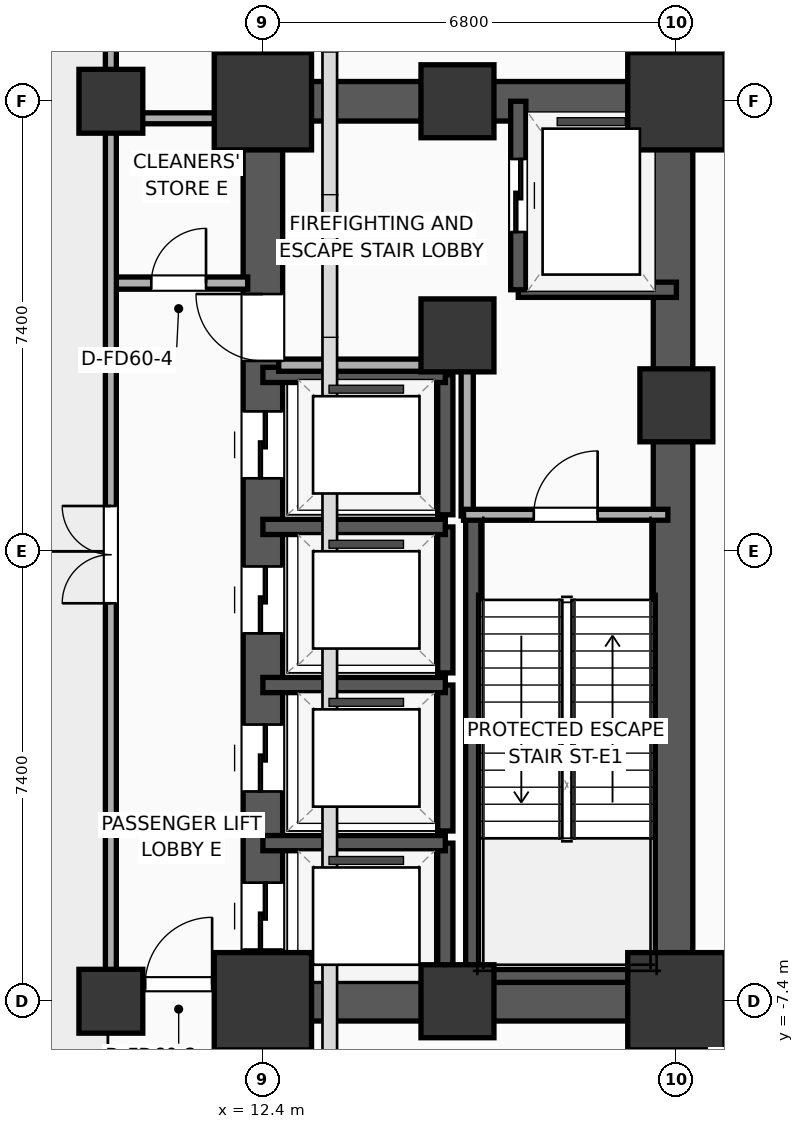
"""IFC4 building model, lengths in metres.
Left out: names, types, materials, properties, quantities, classifications, styles, units other than length and angle.
Written with IfcOpenShell. Run it as: python <this file> out.ifc"""

import sys

from ifc_helpers import new_model, si_unit, direction, frame, frame_2d, origin, origin_2d, place, context, subcontext, project, spatial, rectangle, extrude, element, fill, save


model = new_model("IFC4")
c1 = context("Model", 3, precision=1e-05, world=origin(), true_north=direction((0.0, 1.0)))
c2 = subcontext(c1, "Body", "Model", "MODEL_VIEW")
j1 = project(units=[si_unit("LENGTHUNIT", "METRE"), si_unit("PLANEANGLEUNIT", "RADIAN")], contexts=[c1])
p1 = place(None, origin())
s1 = spatial("IfcSite", under=j1, at=p1, CompositionType="ELEMENT")
p2 = place(p1, origin())
s2 = spatial("IfcBuilding", under=s1, at=p2, CompositionType="ELEMENT")
p3 = place(p2, origin())
s3 = spatial("IfcBuildingStorey", under=s2, at=p3, CompositionType="ELEMENT", Elevation=0.0)
p4 = place(p3, frame((12.4, -7.4, 0.0), z_axis=(0.0, 0.0, 1.0), x_axis=(1.0, 0.0, 0.0)))
e1 = element("IfcColumn", 1, at=p4, inside=s3, PredefinedType="COLUMN", context=c2, shape_type="SweptSolid", body=[
    extrude(rectangle(XDim=1.6, YDim=1.6, at=origin_2d()), origin(), (0.0, 0.0, 1.0), 5.2),
])
p5 = place(p3, frame((15.6, 3.55, 0.0), z_axis=(0.0, 0.0, 1.0), x_axis=(1.0, 0.0, 0.0)))
e2 = element("IfcColumn", 2, at=p5, inside=s3, PredefinedType="COLUMN", context=c2, shape_type="SweptSolid", body=[
    extrude(rectangle(XDim=1.2, YDim=1.2, at=origin_2d()), origin(), (0.0, 0.0, 1.0), 5.2),
])
p6 = place(p3, frame((12.4, 7.4, 0.0), z_axis=(0.0, 0.0, 1.0), x_axis=(1.0, 0.0, 0.0)))
e3 = element("IfcColumn", 3, at=p6, inside=s3, PredefinedType="COLUMN", context=c2, shape_type="SweptSolid", body=[
    extrude(rectangle(XDim=1.6, YDim=1.6, at=origin_2d()), origin(), (0.0, 0.0, 1.0), 5.2),
])
for number, where, z_axis, x_axis in (
    (4, (15.6, -7.4, 0.0), (0.0, 0.0, 1.0), (1.0, 0.0, 0.0)),
    (5, (15.6, 7.4, 0.0), (0.0, 0.0, 1.0), (1.0, 0.0, 0.0)),
):
    element("IfcColumn", number, at=place(p3, frame(where, z_axis=z_axis, x_axis=x_axis)), inside=s3, PredefinedType="COLUMN", context=c2, shape_type="SweptSolid", body=[
        extrude(rectangle(XDim=1.2, YDim=1.2, at=origin_2d()), origin(), (0.0, 0.0, 1.0), 5.2),
    ])
p7 = place(p3, frame((19.2, -7.4, 0.0), z_axis=(0.0, 0.0, 1.0), x_axis=(1.0, 0.0, 0.0)))
e6 = element("IfcColumn", 6, at=p7, inside=s3, PredefinedType="COLUMN", context=c2, shape_type="SweptSolid", body=[
    extrude(rectangle(XDim=1.6, YDim=1.6, at=origin_2d()), origin(), (0.0, 0.0, 1.0), 5.2),
])
p8 = place(p3, frame((19.2, 2.4, 0.0), z_axis=(0.0, 0.0, 1.0), x_axis=(1.0, 0.0, 0.0)))
e7 = element("IfcColumn", 7, at=p8, inside=s3, PredefinedType="COLUMN", context=c2, shape_type="SweptSolid", body=[
    extrude(rectangle(XDim=1.2, YDim=1.2, at=origin_2d()), origin(), (0.0, 0.0, 1.0), 5.2),
])
p9 = place(p3, frame((19.2, 7.4, 0.0), z_axis=(0.0, 0.0, 1.0), x_axis=(1.0, 0.0, 0.0)))
e8 = element("IfcColumn", 8, at=p9, inside=s3, PredefinedType="COLUMN", context=c2, shape_type="SweptSolid", body=[
    extrude(rectangle(XDim=1.6, YDim=1.6, at=origin_2d()), origin(), (0.0, 0.0, 1.0), 5.2),
])
for number, where, z_axis, x_axis in (
    (9, (12.075, -7.4, 0.0), (0.0, 0.0, 1.0), (1.0, 0.0, 0.0)),
    (10, (12.075, 7.4, 0.0), (0.0, 0.0, 1.0), (1.0, 0.0, 0.0)),
):
    element("IfcWall", number, at=place(p3, frame(where, z_axis=z_axis, x_axis=x_axis)), inside=s3, PredefinedType="SHEAR", context=c2, shape_type="SweptSolid", body=[
        extrude(rectangle(XDim=7.45, YDim=0.65, at=frame_2d((3.725, 0.0))), origin(), (0.0, 0.0, 1.0), 4.92),
    ])
p10 = place(p3, frame((12.4, -7.4, 0.0), z_axis=(0.0, 0.0, 1.0), x_axis=(0.0, 1.0, 0.0)))
e11 = element("IfcWall", 11, at=p10, inside=s3, PredefinedType="SHEAR", context=c2, shape_type="SweptSolid", body=[
    extrude(rectangle(XDim=14.8, YDim=0.65, at=frame_2d((7.4, 0.0))), origin(), (0.0, 0.0, 1.0), 4.92),
])
p11 = place(p10, frame((0.85, 0.0, 0.0)))
e12 = element("IfcOpeningElement", 12, at=p11, cuts=e11, PredefinedType="OPENING", context=c2, shape_type="SweptSolid", body=[
    extrude(rectangle(XDim=1.1, YDim=2.05, at=frame_2d((0.55, 1.025))), frame((0.0, 0.335, 0.0), z_axis=(0.0, -1.0, 0.0), x_axis=(1.0, 0.0, 0.0)), (0.0, 0.0, 1.0), 0.67),
])
p12 = place(p10, frame((3.45, 0.0, 0.0)))
e13 = element("IfcOpeningElement", 13, at=p12, cuts=e11, PredefinedType="OPENING", context=c2, shape_type="SweptSolid", body=[
    extrude(rectangle(XDim=1.1, YDim=2.05, at=frame_2d((0.55, 1.025))), frame((0.0, 0.335, 0.0), z_axis=(0.0, -1.0, 0.0), x_axis=(1.0, 0.0, 0.0)), (0.0, 0.0, 1.0), 0.67),
])
p13 = place(p10, frame((6.05, 0.0, 0.0)))
e14 = element("IfcOpeningElement", 14, at=p13, cuts=e11, PredefinedType="OPENING", context=c2, shape_type="SweptSolid", body=[
    extrude(rectangle(XDim=1.1, YDim=2.05, at=frame_2d((0.55, 1.025))), frame((0.0, 0.335, 0.0), z_axis=(0.0, -1.0, 0.0), x_axis=(1.0, 0.0, 0.0)), (0.0, 0.0, 1.0), 0.67),
])
p14 = place(p10, frame((8.6, 0.0, 0.0)))
e15 = element("IfcOpeningElement", 15, at=p14, cuts=e11, PredefinedType="OPENING", context=c2, shape_type="SweptSolid", body=[
    extrude(rectangle(XDim=1.1, YDim=2.05, at=frame_2d((0.55, 1.025))), frame((0.0, 0.335, 0.0), z_axis=(0.0, -1.0, 0.0), x_axis=(1.0, 0.0, 0.0)), (0.0, 0.0, 1.0), 0.67),
])
p15 = place(p10, frame((10.53, 0.0, 0.0)))
e16 = element("IfcOpeningElement", 16, at=p15, cuts=e11, PredefinedType="OPENING", context=c2, shape_type="SweptSolid", body=[
    extrude(rectangle(XDim=1.1, YDim=2.05, at=frame_2d((0.55, 1.025))), frame((0.0, 0.335, 0.0), z_axis=(0.0, -1.0, 0.0), x_axis=(1.0, 0.0, 0.0)), (0.0, 0.0, 1.0), 0.67),
])
p16 = place(p3, frame((19.145, -7.4, 0.0), z_axis=(0.0, 0.0, 1.0), x_axis=(0.0, 1.0, 0.0)))
e17 = element("IfcWall", 17, at=p16, inside=s3, PredefinedType="SHEAR", context=c2, shape_type="SweptSolid", body=[
    extrude(rectangle(XDim=14.8, YDim=0.65, at=frame_2d((7.4, 0.0))), origin(), (0.0, 0.0, 1.0), 4.92),
])
p17 = place(p3, frame((15.86, -7.085, 0.0), z_axis=(0.0, 0.0, 1.0), x_axis=(0.0, 1.0, 0.0)))
e18 = element("IfcWall", 18, at=p17, inside=s3, PredefinedType="SOLIDWALL", context=c2, shape_type="SweptSolid", body=[
    extrude(rectangle(XDim=7.685, YDim=0.25, at=frame_2d((3.843, 0.0))), origin(), (0.0, 0.0, 1.0), 4.92),
])
p18 = place(p3, frame((15.74, -6.965, 0.0), z_axis=(0.0, 0.0, 1.0), x_axis=(1.0, 0.0, 0.0)))
e19 = element("IfcWall", 19, at=p18, inside=s3, PredefinedType="SOLIDWALL", context=c2, shape_type="SweptSolid", body=[
    extrude(rectangle(XDim=3.46, YDim=0.25, at=frame_2d((1.73, 0.0))), origin(), (0.0, 0.0, 1.0), 4.92),
])
for number, where, z_axis, x_axis in (
    (20, (9.9, -7.4, 0.0), (0.0, 0.0, 1.0), (1.0, 0.0, 0.0)),
    (21, (9.9, 7.4, 0.0), (0.0, 0.0, 1.0), (1.0, 0.0, 0.0)),
):
    element("IfcColumn", number, at=place(p3, frame(where, z_axis=z_axis, x_axis=x_axis)), inside=s3, PredefinedType="COLUMN", context=c2, shape_type="SweptSolid", body=[
        extrude(rectangle(XDim=1.05, YDim=1.05, at=origin_2d()), origin(), (0.0, 0.0, 1.0), 5.2),
    ])
p19 = place(p3, frame((16.6, 4.3, 0.0), z_axis=(0.0, 0.0, 1.0), x_axis=(1.0, 0.0, 0.0)))
e22 = element("IfcWall", 22, at=p19, inside=s3, PredefinedType="SOLIDWALL", context=c2, shape_type="SweptSolid", body=[
    extrude(rectangle(XDim=2.6, YDim=0.25, at=frame_2d((1.3, 0.0))), origin(), (0.0, 0.0, 1.0), 4.92),
])
p20 = place(p3, frame((16.6, 7.4, 0.0), z_axis=(0.0, 0.0, 1.0), x_axis=(0.0, -1.0, 0.0)))
e23 = element("IfcWall", 23, at=p20, inside=s3, PredefinedType="SOLIDWALL", context=c2, shape_type="SweptSolid", body=[
    extrude(rectangle(XDim=3.1, YDim=0.25, at=frame_2d((1.55, 0.0))), origin(), (0.0, 0.0, 1.0), 4.92),
])
p21 = place(p20, frame((0.95, 0.0, 0.0)))
e24 = element("IfcOpeningElement", 24, at=p21, cuts=e23, PredefinedType="OPENING", context=c2, shape_type="SweptSolid", body=[
    extrude(rectangle(XDim=1.2, YDim=2.05, at=frame_2d((0.6, 1.025))), frame((0.0, 0.135, 0.0), z_axis=(0.0, -1.0, 0.0), x_axis=(1.0, 0.0, 0.0)), (0.0, 0.0, 1.0), 0.27),
])
p22 = place(p3, frame((15.4, -7.4, 0.0), z_axis=(0.0, 0.0, 1.0), x_axis=(0.0, 1.0, 0.0)))
e25 = element("IfcWall", 25, at=p22, inside=s3, PredefinedType="SOLIDWALL", context=c2, shape_type="SweptSolid", body=[
    extrude(rectangle(XDim=2.6, YDim=0.25, at=frame_2d((1.3, 0.0))), origin(), (0.0, 0.0, 1.0), 4.92),
])
p23 = place(p3, frame((15.4, -4.8, 0.0), z_axis=(0.0, 0.0, 1.0), x_axis=(-1.0, 0.0, 0.0)))
e26 = element("IfcWall", 26, at=p23, inside=s3, PredefinedType="SOLIDWALL", context=c2, shape_type="SweptSolid", body=[
    extrude(rectangle(XDim=3.0, YDim=0.25, at=frame_2d((1.5, 0.0))), origin(), (0.0, 0.0, 1.0), 4.92),
])
p24 = place(p3, frame((15.4, -4.6, 0.0), z_axis=(0.0, 0.0, 1.0), x_axis=(0.0, 1.0, 0.0)))
e27 = element("IfcWall", 27, at=p24, inside=s3, PredefinedType="SOLIDWALL", context=c2, shape_type="SweptSolid", body=[
    extrude(rectangle(XDim=2.4, YDim=0.25, at=frame_2d((1.2, 0.0))), origin(), (0.0, 0.0, 1.0), 4.92),
])
p25 = place(p3, frame((15.4, -2.2, 0.0), z_axis=(0.0, 0.0, 1.0), x_axis=(-1.0, 0.0, 0.0)))
e28 = element("IfcWall", 28, at=p25, inside=s3, PredefinedType="SOLIDWALL", context=c2, shape_type="SweptSolid", body=[
    extrude(rectangle(XDim=3.0, YDim=0.25, at=frame_2d((1.5, 0.0))), origin(), (0.0, 0.0, 1.0), 4.92),
])
p26 = place(p3, frame((15.4, -2.0, 0.0), z_axis=(0.0, 0.0, 1.0), x_axis=(0.0, 1.0, 0.0)))
e29 = element("IfcWall", 29, at=p26, inside=s3, PredefinedType="SOLIDWALL", context=c2, shape_type="SweptSolid", body=[
    extrude(rectangle(XDim=2.4, YDim=0.25, at=frame_2d((1.2, 0.0))), origin(), (0.0, 0.0, 1.0), 4.92),
])
p27 = place(p3, frame((15.4, 0.4, 0.0), z_axis=(0.0, 0.0, 1.0), x_axis=(-1.0, 0.0, 0.0)))
e30 = element("IfcWall", 30, at=p27, inside=s3, PredefinedType="SOLIDWALL", context=c2, shape_type="SweptSolid", body=[
    extrude(rectangle(XDim=3.0, YDim=0.25, at=frame_2d((1.5, 0.0))), origin(), (0.0, 0.0, 1.0), 4.92),
])
p28 = place(p3, frame((15.4, 0.6, 0.0), z_axis=(0.0, 0.0, 1.0), x_axis=(0.0, 1.0, 0.0)))
e31 = element("IfcWall", 31, at=p28, inside=s3, PredefinedType="SOLIDWALL", context=c2, shape_type="SweptSolid", body=[
    extrude(rectangle(XDim=2.3, YDim=0.25, at=frame_2d((1.15, 0.0))), origin(), (0.0, 0.0, 1.0), 4.92),
])
p29 = place(p3, frame((15.4, 2.9, 0.0), z_axis=(0.0, 0.0, 1.0), x_axis=(-1.0, 0.0, 0.0)))
e32 = element("IfcWall", 32, at=p29, inside=s3, PredefinedType="SOLIDWALL", context=c2, shape_type="SweptSolid", body=[
    extrude(rectangle(XDim=3.0, YDim=0.25, at=frame_2d((1.5, 0.0))), origin(), (0.0, 0.0, 1.0), 4.92),
])
p30 = place(p3, frame((15.76, 0.58, 0.0), z_axis=(0.0, 0.0, 1.0), x_axis=(0.0, 1.0, 0.0)))
e33 = element("IfcWall", 33, at=p30, inside=s3, PredefinedType="PARTITIONING", context=c2, shape_type="SweptSolid", body=[
    extrude(rectangle(XDim=2.52, YDim=0.2, at=frame_2d((1.26, 0.0))), origin(), (0.0, 0.0, 1.0), 4.92),
])
p31 = place(p3, frame((12.66, 3.06, 0.0), z_axis=(0.0, 0.0, 1.0), x_axis=(1.0, 0.0, 0.0)))
e34 = element("IfcWall", 34, at=p31, inside=s3, PredefinedType="PARTITIONING", context=c2, shape_type="SweptSolid", body=[
    extrude(rectangle(XDim=3.16, YDim=0.2, at=frame_2d((1.58, 0.0))), origin(), (0.0, 0.0, 1.0), 4.92),
])
p32 = place(p3, frame((15.7, 0.6, 0.0), z_axis=(0.0, 0.0, 1.0), x_axis=(1.0, 0.0, 0.0)))
e35 = element("IfcWall", 35, at=p32, inside=s3, PredefinedType="PARTITIONING", context=c2, shape_type="SweptSolid", body=[
    extrude(rectangle(XDim=3.36, YDim=0.18, at=frame_2d((1.68, 0.0))), origin(), (0.0, 0.0, 1.0), 4.92),
])
p33 = place(p32, frame((1.155, 0.0, 0.0)))
e36 = element("IfcOpeningElement", 36, at=p33, cuts=e35, PredefinedType="OPENING", context=c2, shape_type="SweptSolid", body=[
    extrude(rectangle(XDim=1.05, YDim=2.05, at=frame_2d((0.525, 1.025))), frame((0.0, 0.1, 0.0), z_axis=(0.0, -1.0, 0.0), x_axis=(1.0, 0.0, 0.0)), (0.0, 0.0, 1.0), 0.2),
])
p34 = place(p3, frame((9.88, 4.41, 0.0), z_axis=(0.0, 0.0, 1.0), x_axis=(1.0, 0.0, 0.0)))
e37 = element("IfcWall", 37, at=p34, inside=s3, PredefinedType="PARTITIONING", context=c2, shape_type="SweptSolid", body=[
    extrude(rectangle(XDim=2.27, YDim=0.2, at=frame_2d((1.135, 0.0))), origin(), (0.0, 0.0, 1.0), 4.92),
])
p35 = place(p34, frame((0.685, 0.0, 0.0)))
e38 = element("IfcOpeningElement", 38, at=p35, cuts=e37, PredefinedType="OPENING", context=c2, shape_type="SweptSolid", body=[
    extrude(rectangle(XDim=0.9, YDim=2.05, at=frame_2d((0.45, 1.025))), frame((0.0, 0.11, 0.0), z_axis=(0.0, -1.0, 0.0), x_axis=(1.0, 0.0, 0.0)), (0.0, 0.0, 1.0), 0.22),
])
p36 = place(p3, frame((9.88, 7.12, 0.0), z_axis=(0.0, 0.0, 1.0), x_axis=(1.0, 0.0, 0.0)))
e39 = element("IfcWall", 39, at=p36, inside=s3, PredefinedType="PARTITIONING", context=c2, shape_type="SweptSolid", body=[
    extrude(rectangle(XDim=2.27, YDim=0.18, at=frame_2d((1.135, 0.0))), origin(), (0.0, 0.0, 1.0), 4.21),
])
p37 = place(p3, frame((9.88, -7.12, 0.0), z_axis=(0.0, 0.0, 1.0), x_axis=(1.0, 0.0, 0.0)))
e40 = element("IfcWall", 40, at=p37, inside=s3, PredefinedType="PARTITIONING", context=c2, shape_type="SweptSolid", body=[
    extrude(rectangle(XDim=2.27, YDim=0.18, at=frame_2d((1.135, 0.0))), origin(), (0.0, 0.0, 1.0), 4.21),
])
p38 = place(p37, frame((0.585, 0.0, 0.0)))
e41 = element("IfcOpeningElement", 41, at=p38, cuts=e40, PredefinedType="OPENING", context=c2, shape_type="SweptSolid", body=[
    extrude(rectangle(XDim=1.1, YDim=2.05, at=frame_2d((0.55, 1.025))), frame((0.0, 0.1, 0.0), z_axis=(0.0, -1.0, 0.0), x_axis=(1.0, 0.0, 0.0)), (0.0, 0.0, 1.0), 0.2),
])
p39 = place(p3, frame((9.9, -7.12, 0.0), z_axis=(0.0, 0.0, 1.0), x_axis=(0.0, 1.0, 0.0)))
e42 = element("IfcWall", 42, at=p39, inside=s3, PredefinedType="PARTITIONING", context=c2, shape_type="SweptSolid", body=[
    extrude(rectangle(XDim=16.82, YDim=0.18, at=frame_2d((8.41, 0.0))), origin(), (0.0, 0.0, 1.0), 4.21),
])
p40 = place(p39, frame((6.264, 0.0, 0.0)))
e43 = element("IfcOpeningElement", 43, at=p40, cuts=e42, PredefinedType="OPENING", context=c2, shape_type="SweptSolid", body=[
    extrude(rectangle(XDim=1.6, YDim=2.05, at=frame_2d((0.8, 1.025))), frame((0.0, 0.1, 0.0), z_axis=(0.0, -1.0, 0.0), x_axis=(1.0, 0.0, 0.0)), (0.0, 0.0, 1.0), 0.2),
])
p41 = place(p21, origin())
e44 = element("IfcDoor", 44, at=p41, inside=s3, OperationType="SLIDING_TO_LEFT", PredefinedType="DOOR", context=c2, shape_type="SweptSolid", body=[
    extrude(rectangle(XDim=1.2, YDim=2.05, at=frame_2d((0.6, 1.025))), frame((0.0, 0.025, 0.0), z_axis=(0.0, -1.0, 0.0), x_axis=(1.0, 0.0, 0.0)), (0.0, 0.0, 1.0), 0.05),
])
fill(e24, e44)
p42 = place(p11, origin())
e45 = element("IfcDoor", 45, at=p42, inside=s3, OperationType="SLIDING_TO_LEFT", PredefinedType="DOOR", context=c2, shape_type="SweptSolid", body=[
    extrude(rectangle(XDim=1.1, YDim=2.05, at=frame_2d((0.55, 1.025))), frame((0.0, 0.025, 0.0), z_axis=(0.0, -1.0, 0.0), x_axis=(1.0, 0.0, 0.0)), (0.0, 0.0, 1.0), 0.05),
])
fill(e12, e45)
p43 = place(p12, origin())
e46 = element("IfcDoor", 46, at=p43, inside=s3, OperationType="SLIDING_TO_LEFT", PredefinedType="DOOR", context=c2, shape_type="SweptSolid", body=[
    extrude(rectangle(XDim=1.1, YDim=2.05, at=frame_2d((0.55, 1.025))), frame((0.0, 0.025, 0.0), z_axis=(0.0, -1.0, 0.0), x_axis=(1.0, 0.0, 0.0)), (0.0, 0.0, 1.0), 0.05),
])
fill(e13, e46)
p44 = place(p13, origin())
e47 = element("IfcDoor", 47, at=p44, inside=s3, OperationType="SLIDING_TO_LEFT", PredefinedType="DOOR", context=c2, shape_type="SweptSolid", body=[
    extrude(rectangle(XDim=1.1, YDim=2.05, at=frame_2d((0.55, 1.025))), frame((0.0, 0.025, 0.0), z_axis=(0.0, -1.0, 0.0), x_axis=(1.0, 0.0, 0.0)), (0.0, 0.0, 1.0), 0.05),
])
fill(e14, e47)
p45 = place(p14, origin())
e48 = element("IfcDoor", 48, at=p45, inside=s3, OperationType="SLIDING_TO_LEFT", PredefinedType="DOOR", context=c2, shape_type="SweptSolid", body=[
    extrude(rectangle(XDim=1.1, YDim=2.05, at=frame_2d((0.55, 1.025))), frame((0.0, 0.025, 0.0), z_axis=(0.0, -1.0, 0.0), x_axis=(1.0, 0.0, 0.0)), (0.0, 0.0, 1.0), 0.05),
])
fill(e15, e48)
p46 = place(p33, origin())
e49 = element("IfcDoor", 49, at=p46, inside=s3, OperationType="SINGLE_SWING_RIGHT", PredefinedType="DOOR", context=c2, shape_type="SweptSolid", body=[
    extrude(rectangle(XDim=1.05, YDim=2.05, at=frame_2d((0.525, 1.025))), frame((0.0, 0.025, 0.0), z_axis=(0.0, -1.0, 0.0), x_axis=(1.0, 0.0, 0.0)), (0.0, 0.0, 1.0), 0.05),
])
fill(e36, e49)
p47 = place(p35, origin())
e50 = element("IfcDoor", 50, at=p47, inside=s3, OperationType="SINGLE_SWING_RIGHT", PredefinedType="DOOR", context=c2, shape_type="SweptSolid", body=[
    extrude(rectangle(XDim=0.9, YDim=2.05, at=frame_2d((0.45, 1.025))), frame((0.0, 0.025, 0.0), z_axis=(0.0, -1.0, 0.0), x_axis=(1.0, 0.0, 0.0)), (0.0, 0.0, 1.0), 0.05),
])
fill(e38, e50)
p48 = place(p38, origin())
e51 = element("IfcDoor", 51, at=p48, inside=s3, OperationType="SINGLE_SWING_RIGHT", PredefinedType="DOOR", context=c2, shape_type="SweptSolid", body=[
    extrude(rectangle(XDim=1.1, YDim=2.05, at=frame_2d((0.55, 1.025))), frame((0.0, 0.025, 0.0), z_axis=(0.0, -1.0, 0.0), x_axis=(1.0, 0.0, 0.0)), (0.0, 0.0, 1.0), 0.05),
])
fill(e41, e51)
p49 = place(p40, origin())
e52 = element("IfcDoor", 52, at=p49, inside=s3, OperationType="DOUBLE_DOOR_SINGLE_SWING", PredefinedType="DOOR", context=c2, shape_type="SweptSolid", body=[
    extrude(rectangle(XDim=1.6, YDim=2.05, at=frame_2d((0.8, 1.025))), frame((0.0, 0.025, 0.0), z_axis=(0.0, -1.0, 0.0), x_axis=(1.0, 0.0, 0.0)), (0.0, 0.0, 1.0), 0.05),
])
fill(e43, e52)
p50 = place(p15, origin())
e53 = element("IfcDoor", 53, at=p50, inside=s3, OperationType="SINGLE_SWING_RIGHT", PredefinedType="DOOR", context=c2, shape_type="SweptSolid", body=[
    extrude(rectangle(XDim=1.1, YDim=2.05, at=frame_2d((0.55, 1.025))), frame((0.0, 0.025, 0.0), z_axis=(0.0, -1.0, 0.0), x_axis=(1.0, 0.0, 0.0)), (0.0, 0.0, 1.0), 0.05),
])
fill(e16, e53)
save(model, sys.argv[1])
